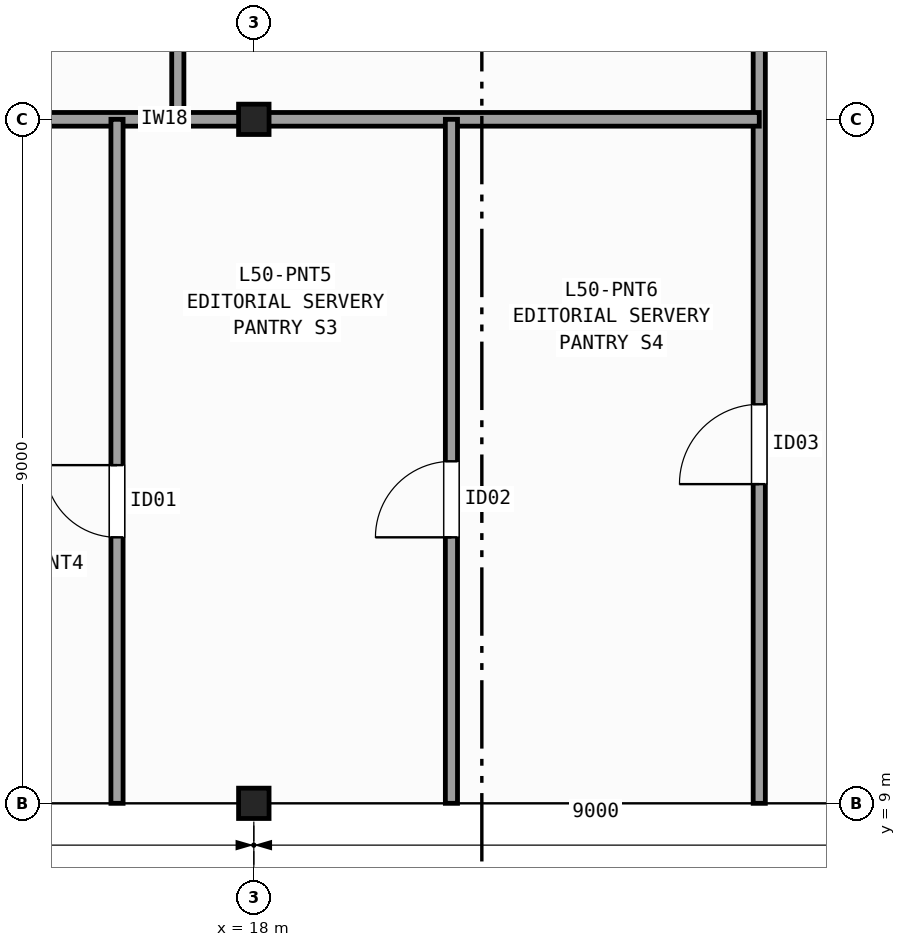
"""IFC4 building model, lengths in metres.
Left out: names, types, materials, properties, quantities, classifications, styles, units other than length and angle.
Written with IfcOpenShell. Run it as: python <this file> out.ifc"""

import sys

from ifc_helpers import new_model, si_unit, direction, frame, frame_2d, origin, origin_2d, place, context, subcontext, project, spatial, rectangle, i_section, extrude, element, fill, save


model = new_model("IFC4")
c1 = context("Model", 3, precision=1e-05, world=origin(), true_north=direction((0.0, 1.0)))
c2 = subcontext(c1, "Body", "Model", "MODEL_VIEW")
j1 = project(units=[si_unit("LENGTHUNIT", "METRE"), si_unit("PLANEANGLEUNIT", "RADIAN")], contexts=[c1])
p1 = place(None, origin())
s1 = spatial("IfcSite", under=j1, at=p1, CompositionType="ELEMENT")
p2 = place(p1, origin())
s2 = spatial("IfcBuilding", under=s1, at=p2, CompositionType="ELEMENT")
p3 = place(p2, frame((0.0, 0.0, 201.2)))
s3 = spatial("IfcBuildingStorey", under=s2, at=p3, CompositionType="ELEMENT", Elevation=201.2)
for number, where, z_axis, x_axis in (
    (1, (18.0, 9.0, 0.0), (0.0, 0.0, 1.0), (1.0, 0.0, 0.0)),
    (2, (18.0, 18.0, 0.0), (0.0, 0.0, 1.0), (1.0, 0.0, 0.0)),
):
    element("IfcColumn", number, at=place(p3, frame(where, z_axis=z_axis, x_axis=x_axis)), inside=s3, PredefinedType="COLUMN", context=c2, shape_type="SweptSolid", body=[
        extrude(i_section(OverallWidth=0.401, OverallDepth=0.399, WebThickness=0.025, FlangeThickness=0.04, FilletRadius=0.015, at=origin_2d()), origin(), (0.0, 0.0, 1.0), 5.0),
    ])
p4 = place(p3, frame((24.65, 9.0, 0.0), z_axis=(0.0, 0.0, 1.0), x_axis=(0.0, 1.0, 0.0)))
e3 = element("IfcWall", 3, at=p4, inside=s3, PredefinedType="PARTITIONING", context=c2, shape_type="SweptSolid", body=[
    extrude(rectangle(XDim=19.2, YDim=0.16, at=frame_2d((9.6, 0.0))), origin(), (0.0, 0.0, 1.0), 4.007),
])
p5 = place(p4, frame((12.2, 0.0, 0.0)))
e4 = element("IfcOpeningElement", 4, at=p5, cuts=e3, PredefinedType="OPENING", context=c2, shape_type="SweptSolid", body=[
    extrude(rectangle(XDim=1.0, YDim=2.1, at=frame_2d((0.5, 1.05))), frame((0.0, 0.09, 0.0), z_axis=(0.0, -1.0, 0.0), x_axis=(1.0, 0.0, 0.0)), (0.0, 0.0, 1.0), 0.18),
])
p6 = place(p4, frame((4.2, 0.0, 0.0)))
e5 = element("IfcOpeningElement", 5, at=p6, cuts=e3, PredefinedType="OPENING", context=c2, shape_type="SweptSolid", body=[
    extrude(rectangle(XDim=1.05, YDim=2.15, at=frame_2d((0.525, 1.075))), frame((0.0, 0.09, 0.0), z_axis=(0.0, -1.0, 0.0), x_axis=(1.0, 0.0, 0.0)), (0.0, 0.0, 1.0), 0.18),
])
p7 = place(p3, frame((9.0, 18.0, 0.0), z_axis=(0.0, 0.0, 1.0), x_axis=(1.0, 0.0, 0.0)))
e6 = element("IfcWall", 6, at=p7, inside=s3, PredefinedType="PARTITIONING", context=c2, shape_type="SweptSolid", body=[
    extrude(rectangle(XDim=15.65, YDim=0.18, at=frame_2d((7.825, 0.0))), origin(), (0.0, 0.0, 1.0), 4.007),
])
p8 = place(p3, frame((17.0, 18.0, 0.0), z_axis=(0.0, 0.0, 1.0), x_axis=(0.0, 1.0, 0.0)))
e7 = element("IfcWall", 7, at=p8, inside=s3, PredefinedType="PARTITIONING", context=c2, shape_type="SweptSolid", body=[
    extrude(rectangle(XDim=10.13, YDim=0.16, at=frame_2d((5.065, 0.0))), origin(), (0.0, 0.0, 1.0), 4.089),
])
p9 = place(p8, frame((2.5, 0.0, 0.0)))
e8 = element("IfcOpeningElement", 8, at=p9, cuts=e7, PredefinedType="OPENING", context=c2, shape_type="SweptSolid", body=[
    extrude(rectangle(XDim=1.2, YDim=2.15, at=frame_2d((0.6, 1.075))), frame((0.0, 0.09, 0.0), z_axis=(0.0, -1.0, 0.0), x_axis=(1.0, 0.0, 0.0)), (0.0, 0.0, 1.0), 0.18),
])
p10 = place(p3, frame((16.2, 9.0, 0.0), z_axis=(0.0, 0.0, 1.0), x_axis=(0.0, 1.0, 0.0)))
e9 = element("IfcWall", 9, at=p10, inside=s3, PredefinedType="PARTITIONING", context=c2, shape_type="SweptSolid", body=[
    extrude(rectangle(XDim=9.0, YDim=0.16, at=frame_2d((4.5, 0.0))), origin(), (0.0, 0.0, 1.0), 4.089),
])
p11 = place(p10, frame((3.5, 0.0, 0.0)))
e10 = element("IfcOpeningElement", 10, at=p11, cuts=e9, PredefinedType="OPENING", context=c2, shape_type="SweptSolid", body=[
    extrude(rectangle(XDim=0.95, YDim=2.1, at=frame_2d((0.475, 1.05))), frame((0.0, 0.09, 0.0), z_axis=(0.0, -1.0, 0.0), x_axis=(1.0, 0.0, 0.0)), (0.0, 0.0, 1.0), 0.18),
])
p12 = place(p3, frame((20.6, 9.0, 0.0), z_axis=(0.0, 0.0, 1.0), x_axis=(0.0, 1.0, 0.0)))
e11 = element("IfcWall", 11, at=p12, inside=s3, PredefinedType="PARTITIONING", context=c2, shape_type="SweptSolid", body=[
    extrude(rectangle(XDim=9.0, YDim=0.16, at=frame_2d((4.5, 0.0))), origin(), (0.0, 0.0, 1.0), 4.007),
])
p13 = place(p12, frame((3.5, 0.0, 0.0)))
e12 = element("IfcOpeningElement", 12, at=p13, cuts=e11, PredefinedType="OPENING", context=c2, shape_type="SweptSolid", body=[
    extrude(rectangle(XDim=1.0, YDim=2.1, at=frame_2d((0.5, 1.05))), frame((0.0, 0.09, 0.0), z_axis=(0.0, -1.0, 0.0), x_axis=(1.0, 0.0, 0.0)), (0.0, 0.0, 1.0), 0.18),
])
p14 = place(p6, origin())
e13 = element("IfcDoor", 13, at=p14, inside=s3, OperationType="SINGLE_SWING_LEFT", PredefinedType="DOOR", context=c2, shape_type="SweptSolid", body=[
    extrude(rectangle(XDim=1.05, YDim=2.15, at=frame_2d((0.525, 1.075))), frame((0.0, 0.025, 0.0), z_axis=(0.0, -1.0, 0.0), x_axis=(1.0, 0.0, 0.0)), (0.0, 0.0, 1.0), 0.05),
])
fill(e5, e13)
p15 = place(p11, origin())
e14 = element("IfcDoor", 14, at=p15, inside=s3, OperationType="SINGLE_SWING_RIGHT", PredefinedType="DOOR", context=c2, shape_type="SweptSolid", body=[
    extrude(rectangle(XDim=0.95, YDim=2.1, at=frame_2d((0.475, 1.05))), frame((0.0, 0.025, 0.0), z_axis=(0.0, -1.0, 0.0), x_axis=(1.0, 0.0, 0.0)), (0.0, 0.0, 1.0), 0.05),
])
fill(e10, e14)
p16 = place(p13, origin())
e15 = element("IfcDoor", 15, at=p16, inside=s3, OperationType="SINGLE_SWING_LEFT", PredefinedType="DOOR", context=c2, shape_type="SweptSolid", body=[
    extrude(rectangle(XDim=1.0, YDim=2.1, at=frame_2d((0.5, 1.05))), frame((0.0, 0.025, 0.0), z_axis=(0.0, -1.0, 0.0), x_axis=(1.0, 0.0, 0.0)), (0.0, 0.0, 1.0), 0.05),
])
fill(e12, e15)
save(model, sys.argv[1])
